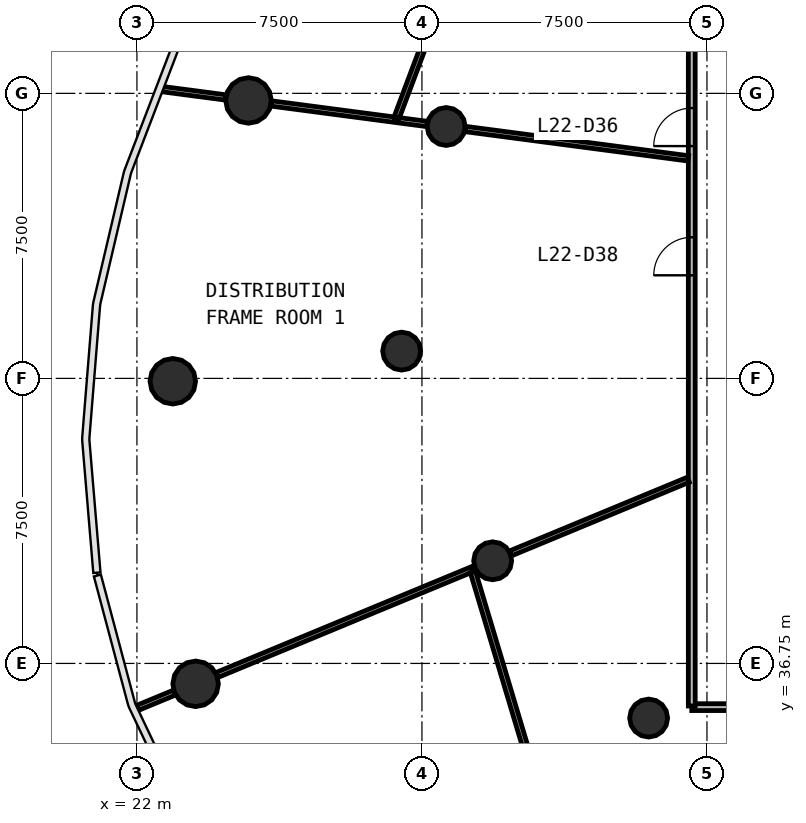
"""IFC4 building model, lengths in metres.
Left out: names, types, materials, properties, quantities, classifications, styles, units other than length and angle.
Written with IfcOpenShell. Run it as: python <this file> out.ifc"""

import sys

from ifc_helpers import new_model, si_unit, direction, frame, frame_2d, origin, origin_2d, place, context, subcontext, project, spatial, rectangle, circle, extrude, source, transform, mapped, element, fill, save


model = new_model("IFC4")
c1 = context("Model", 3, precision=1e-05, world=origin(), true_north=direction((0.0, 1.0)))
c2 = subcontext(c1, "Body", "Model", "MODEL_VIEW")
j1 = project(units=[si_unit("LENGTHUNIT", "METRE"), si_unit("PLANEANGLEUNIT", "RADIAN")], contexts=[c1])
p1 = place(None, origin())
s1 = spatial("IfcSite", under=j1, at=p1, CompositionType="ELEMENT")
p2 = place(p1, origin())
s2 = spatial("IfcBuilding", under=s1, at=p2, CompositionType="ELEMENT")
p3 = place(p2, frame((0.0, 0.0, 96.2)))
s3 = spatial("IfcBuildingStorey", under=s2, at=p3, CompositionType="ELEMENT", Elevation=96.2)
m1 = source(origin(), c2, "Body", "SweptSolid", [
    extrude(circle(Radius=0.6, at=origin_2d()), origin(), (0.0, 0.0, 1.0), 4.1),
])
for number, where, z_axis, x_axis in (
    (1, (24.936, 51.563, 0.0), (0.0, 0.0, 1.0), (1.0, 0.0, 0.0)),
    (2, (22.944, 44.175, 0.0), (0.0, 0.0, 1.0), (1.0, 0.0, 0.0)),
    (3, (23.544, 36.213, 0.0), (0.0, 0.0, 1.0), (1.0, 0.0, 0.0)),
):
    element("IfcColumn", number, at=place(p3, frame(where, z_axis=z_axis, x_axis=x_axis)), inside=s3, PredefinedType="COLUMN", context=c2, shape_type="MappedRepresentation", body=[
        mapped(m1, transform((0.0, 0.0, 0.0), scale=1.0)),
    ])
m2 = source(origin(), c2, "Body", "SweptSolid", [
    extrude(circle(Radius=0.5, at=origin_2d()), origin(), (0.0, 0.0, 1.0), 4.1),
])
for number, where, z_axis, x_axis in (
    (4, (30.137, 50.878, 0.0), (0.0, 0.0, 1.0), (1.0, 0.0, 0.0)),
    (5, (28.966, 44.968, 0.0), (0.0, 0.0, 1.0), (1.0, 0.0, 0.0)),
    (6, (31.361, 39.451, 0.0), (0.0, 0.0, 1.0), (1.0, 0.0, 0.0)),
    (7, (35.465, 35.312, 0.0), (0.0, 0.0, 1.0), (1.0, 0.0, 0.0)),
):
    element("IfcColumn", number, at=place(p3, frame(where, z_axis=z_axis, x_axis=x_axis)), inside=s3, PredefinedType="COLUMN", context=c2, shape_type="MappedRepresentation", body=[
        mapped(m2, transform((0.0, 0.0, 0.0), scale=1.0)),
    ])
p4 = place(p3, frame((67.4, 35.6, 0.0), z_axis=(0.0, 0.0, 1.0), x_axis=(-1.0, 0.0, 0.0)))
e8 = element("IfcWall", 8, at=p4, inside=s3, PredefinedType="PARTITIONING", context=c2, shape_type="SweptSolid", body=[
    extrude(rectangle(XDim=30.8, YDim=0.18, at=frame_2d((15.4, 0.0))), origin(), (0.0, 0.0, 1.0), 2.9),
])
p5 = place(p4, frame((9.05, 0.0, 0.0)))
e9 = element("IfcOpeningElement", 9, at=p5, cuts=e8, PredefinedType="OPENING", context=c2, shape_type="SweptSolid", body=[
    extrude(rectangle(XDim=0.9, YDim=2.1, at=frame_2d((0.45, 1.05))), frame((0.0, 0.1, 0.0), z_axis=(0.0, -1.0, 0.0), x_axis=(1.0, 0.0, 0.0)), (0.0, 0.0, 1.0), 0.2),
])
p6 = place(p4, frame((6.05, 0.0, 0.0)))
e10 = element("IfcOpeningElement", 10, at=p6, cuts=e8, PredefinedType="OPENING", context=c2, shape_type="SweptSolid", body=[
    extrude(rectangle(XDim=0.9, YDim=2.1, at=frame_2d((0.45, 1.05))), frame((0.0, 0.1, 0.0), z_axis=(0.0, -1.0, 0.0), x_axis=(1.0, 0.0, 0.0)), (0.0, 0.0, 1.0), 0.2),
])
p7 = place(p4, frame((2.45, 0.0, 0.0)))
e11 = element("IfcOpeningElement", 11, at=p7, cuts=e8, PredefinedType="OPENING", context=c2, shape_type="SweptSolid", body=[
    extrude(rectangle(XDim=0.9, YDim=2.1, at=frame_2d((0.45, 1.05))), frame((0.0, 0.1, 0.0), z_axis=(0.0, -1.0, 0.0), x_axis=(1.0, 0.0, 0.0)), (0.0, 0.0, 1.0), 0.2),
])
p8 = place(p4, frame((20.95, 0.0, 0.0)))
e12 = element("IfcOpeningElement", 12, at=p8, cuts=e8, PredefinedType="OPENING", context=c2, shape_type="SweptSolid", body=[
    extrude(rectangle(XDim=1.0, YDim=2.1, at=frame_2d((0.5, 1.05))), frame((0.0, 0.1, 0.0), z_axis=(0.0, -1.0, 0.0), x_axis=(1.0, 0.0, 0.0)), (0.0, 0.0, 1.0), 0.2),
])
p9 = place(p4, frame((14.95, 0.0, 0.0)))
e13 = element("IfcOpeningElement", 13, at=p9, cuts=e8, PredefinedType="OPENING", context=c2, shape_type="SweptSolid", body=[
    extrude(rectangle(XDim=1.0, YDim=2.1, at=frame_2d((0.5, 1.05))), frame((0.0, 0.1, 0.0), z_axis=(0.0, -1.0, 0.0), x_axis=(1.0, 0.0, 0.0)), (0.0, 0.0, 1.0), 0.2),
])
p10 = place(p3, frame((36.6, 35.63, 0.0), z_axis=(0.0, 0.0, 1.0), x_axis=(0.0, 1.0, 0.0)))
e14 = element("IfcWall", 14, at=p10, inside=s3, PredefinedType="PARTITIONING", context=c2, shape_type="SweptSolid", body=[
    extrude(rectangle(XDim=23.583, YDim=0.18, at=frame_2d((11.791, 0.0))), origin(), (0.0, 0.0, 1.0), 2.9),
])
p11 = place(p10, frame((14.732, 0.0, 0.0)))
e15 = element("IfcOpeningElement", 15, at=p11, cuts=e14, PredefinedType="OPENING", context=c2, shape_type="SweptSolid", body=[
    extrude(rectangle(XDim=1.0, YDim=2.1, at=frame_2d((0.5, 1.05))), frame((0.0, 0.1, 0.0), z_axis=(0.0, -1.0, 0.0), x_axis=(1.0, 0.0, 0.0)), (0.0, 0.0, 1.0), 0.2),
])
p12 = place(p10, frame((11.333, 0.0, 0.0)))
e16 = element("IfcOpeningElement", 16, at=p12, cuts=e14, PredefinedType="OPENING", context=c2, shape_type="SweptSolid", body=[
    extrude(rectangle(XDim=1.0, YDim=2.1, at=frame_2d((0.5, 1.05))), frame((0.0, 0.1, 0.0), z_axis=(0.0, -1.0, 0.0), x_axis=(1.0, 0.0, 0.0)), (0.0, 0.0, 1.0), 0.2),
])
p13 = place(p3, frame((30.82, 39.227, 0.0), z_axis=(0.0, 0.0, 1.0), x_axis=(-0.923877674765, -0.382687917331, 0.0)))
e17 = element("IfcWall", 17, at=p13, inside=s3, PredefinedType="PARTITIONING", context=c2, shape_type="SweptSolid", body=[
    extrude(rectangle(XDim=7.27, YDim=0.14, at=frame_2d((3.635, 0.0))), origin(), (0.0, 0.0, 1.0), 2.9),
])
p14 = place(p3, frame((30.841, 39.16, 0.0), z_axis=(0.0, 0.0, 1.0), x_axis=(0.286946329696, -0.957946660245, 0.0)))
e18 = element("IfcWall", 18, at=p14, inside=s3, PredefinedType="PARTITIONING", context=c2, shape_type="SweptSolid", body=[
    extrude(rectangle(XDim=6.248, YDim=0.14, at=frame_2d((3.124, 0.0))), origin(), (0.0, 0.0, 1.0), 2.9),
])
p15 = place(p3, frame((30.941, 56.723, 0.0), z_axis=(0.0, 0.0, 1.0), x_axis=(-0.351569554584, -0.936161763954, 0.0)))
e19 = element("IfcWall", 19, at=p15, inside=s3, PredefinedType="PARTITIONING", context=c2, shape_type="SweptSolid", body=[
    extrude(rectangle(XDim=6.057, YDim=0.14, at=frame_2d((3.028, 0.0))), origin(), (0.0, 0.0, 1.0), 2.9),
])
p16 = place(p3, frame((36.51, 50.039, 0.0), z_axis=(0.0, 0.0, 1.0), x_axis=(-0.991445034615, 0.130524876315, 0.0)))
e20 = element("IfcWall", 20, at=p16, inside=s3, PredefinedType="PARTITIONING", context=c2, shape_type="SweptSolid", body=[
    extrude(rectangle(XDim=5.924, YDim=0.14, at=frame_2d((2.962, 0.0))), origin(), (0.0, 0.0, 1.0), 2.9),
])
p17 = place(p3, frame((36.51, 41.584, 0.0), z_axis=(0.0, 0.0, 1.0), x_axis=(-0.923890025086, -0.382658100067, 0.0)))
e21 = element("IfcWall", 21, at=p17, inside=s3, PredefinedType="PARTITIONING", context=c2, shape_type="SweptSolid", body=[
    extrude(rectangle(XDim=5.068, YDim=0.14, at=frame_2d((2.534, 0.0))), origin(), (0.0, 0.0, 1.0), 2.9),
])
p18 = place(p3, frame((28.883, 51.043, 0.0), z_axis=(0.0, 0.0, 1.0), x_axis=(0.991425859851, -0.130670442021, 0.0)))
e22 = element("IfcWall", 22, at=p18, inside=s3, PredefinedType="PARTITIONING", context=c2, shape_type="SweptSolid", body=[
    extrude(rectangle(XDim=0.76, YDim=0.14, at=frame_2d((0.38, 0.0))), origin(), (0.0, 0.0, 1.0), 2.9),
])
p19 = place(p3, frame((25.535, 51.484, 0.0), z_axis=(0.0, 0.0, 1.0), x_axis=(0.991444651245, -0.130527788296, 0.0)))
e23 = element("IfcWall", 23, at=p19, inside=s3, PredefinedType="PARTITIONING", context=c2, shape_type="SweptSolid", body=[
    extrude(rectangle(XDim=3.275, YDim=0.14, at=frame_2d((1.638, 0.0))), origin(), (0.0, 0.0, 1.0), 2.9),
])
p20 = place(p3, frame((24.336, 51.642, 0.0), z_axis=(0.0, 0.0, 1.0), x_axis=(-0.991440556446, 0.13055888723, 0.0)))
e24 = element("IfcWall", 24, at=p20, inside=s3, PredefinedType="PARTITIONING", context=c2, shape_type="SweptSolid", body=[
    extrude(rectangle(XDim=1.694, YDim=0.14, at=frame_2d((0.847, 0.0))), origin(), (0.0, 0.0, 1.0), 2.9),
])
p21 = place(p3, frame((22.986, 35.982, 0.0), z_axis=(0.0, 0.0, 1.0), x_axis=(-0.923912211219, -0.382604529457, 0.0)))
e25 = element("IfcWall", 25, at=p21, inside=s3, PredefinedType="PARTITIONING", context=c2, shape_type="SweptSolid", body=[
    extrude(rectangle(XDim=1.052, YDim=0.14, at=frame_2d((0.526, 0.0))), origin(), (0.0, 0.0, 1.0), 2.9),
])
m3 = source(origin(), c2, "Body", "SweptSolid", [
    extrude(rectangle(XDim=1.0, YDim=2.1, at=frame_2d((0.5, 1.05))), frame((0.0, 0.025, 0.0), z_axis=(0.0, -1.0, 0.0), x_axis=(1.0, 0.0, 0.0)), (0.0, 0.0, 1.0), 0.05),
])
p22 = place(p11, origin())
e26 = element("IfcDoor", 26, at=p22, inside=s3, OperationType="SINGLE_SWING_LEFT", PredefinedType="DOOR", context=c2, shape_type="MappedRepresentation", body=[
    mapped(m3, transform((0.0, 0.0, 0.0), scale=1.0)),
])
fill(e15, e26)
p23 = place(p12, origin())
e27 = element("IfcDoor", 27, at=p23, inside=s3, OperationType="SINGLE_SWING_LEFT", PredefinedType="DOOR", context=c2, shape_type="MappedRepresentation", body=[
    mapped(m3, transform((0.0, 0.0, 0.0), scale=1.0)),
])
fill(e16, e27)
save(model, sys.argv[1])
